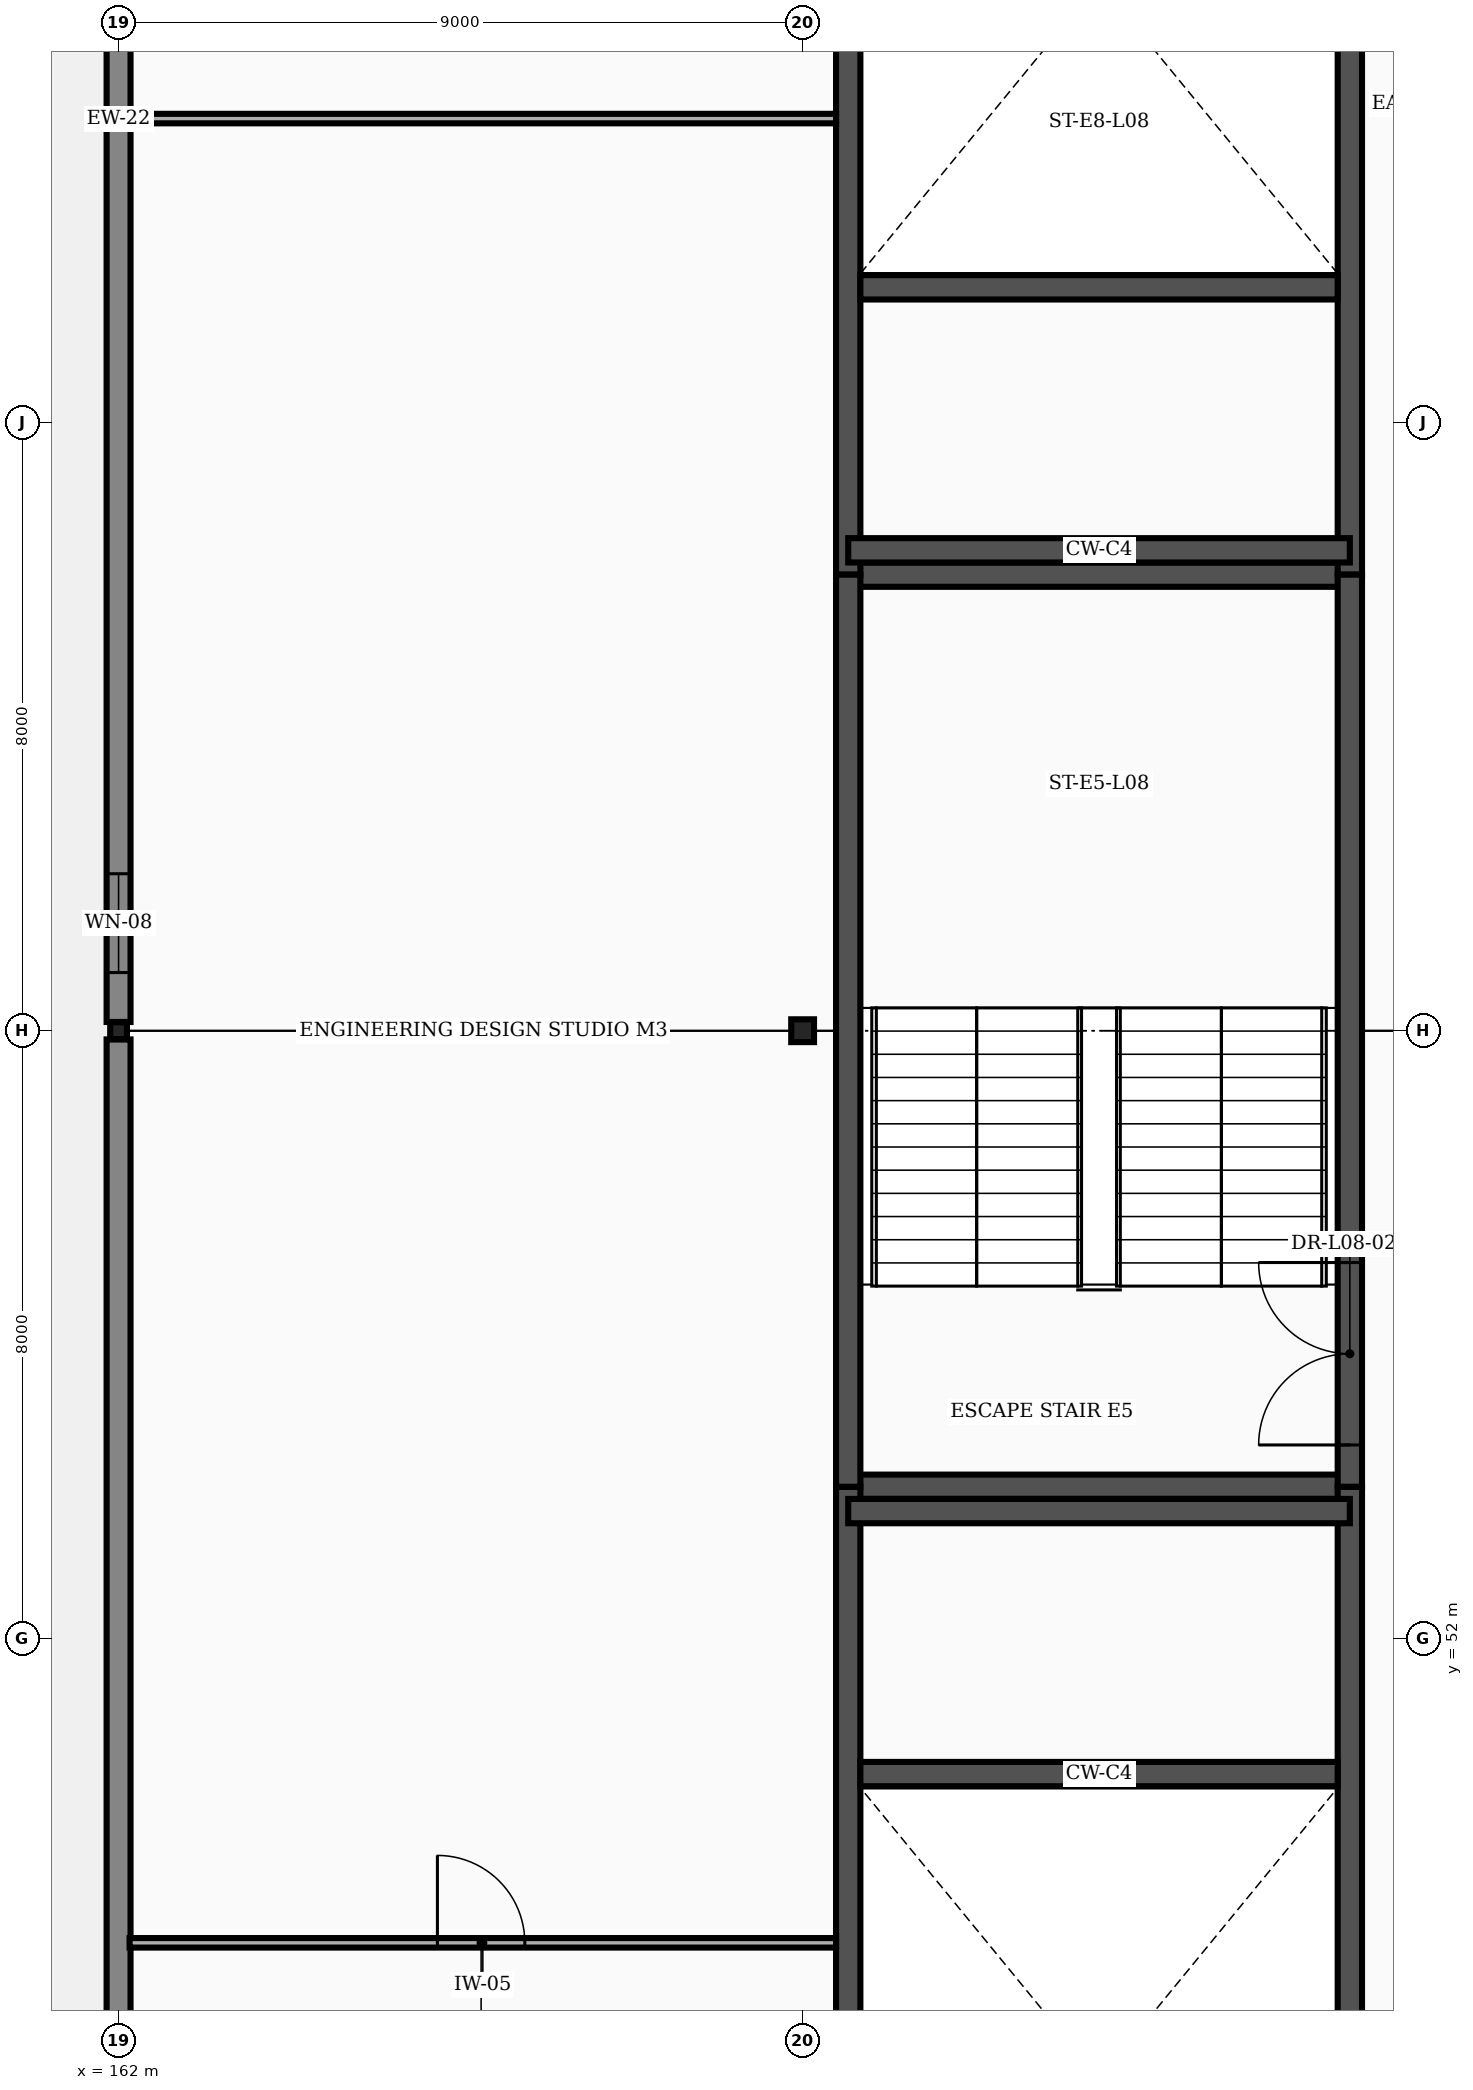
"""IFC4 building model, lengths in metres.
Left out: names, types, materials, properties, quantities, classifications, styles, units other than length and angle.
Written with IfcOpenShell. Run it as: python <this file> out.ifc"""

import sys

from ifc_helpers import new_model, si_unit, direction, frame, frame_2d, origin, origin_2d, place, context, subcontext, project, spatial, rectangle, hollow_rectangle, extrude, element, fill, save


model = new_model("IFC4")
c1 = context("Model", 3, precision=1e-05, world=origin(), true_north=direction((0.0, 1.0)))
c2 = subcontext(c1, "Body", "Model", "MODEL_VIEW")
j1 = project(units=[si_unit("LENGTHUNIT", "METRE"), si_unit("PLANEANGLEUNIT", "RADIAN")], contexts=[c1])
p1 = place(None, origin())
s1 = spatial("IfcSite", under=j1, at=p1, CompositionType="ELEMENT")
p2 = place(p1, origin())
s2 = spatial("IfcBuilding", under=s1, at=p2, CompositionType="ELEMENT")
p3 = place(p2, frame((0.0, 0.0, 37.8)))
s3 = spatial("IfcBuildingStorey", under=s2, at=p3, CompositionType="ELEMENT", Elevation=37.8)
p4 = place(p3, frame((171.0, 60.0, 0.0), z_axis=(0.0, 0.0, 1.0), x_axis=(1.0, 0.0, 0.0)))
e1 = element("IfcColumn", 1, at=p4, inside=s3, PredefinedType="COLUMN", context=c2, shape_type="SweptSolid", body=[
    extrude(hollow_rectangle(XDim=0.3, YDim=0.3, WallThickness=0.012, at=origin_2d()), origin(), (0.0, 0.0, 1.0), 3.9),
])
p5 = place(p3, frame((162.0, 60.0, 0.0), z_axis=(0.0, 0.0, 1.0), x_axis=(1.0, 0.0, 0.0)))
e2 = element("IfcColumn", 2, at=p5, inside=s3, PredefinedType="COLUMN", context=c2, shape_type="SweptSolid", body=[
    extrude(hollow_rectangle(XDim=0.22, YDim=0.22, WallThickness=0.01, at=origin_2d()), origin(), (0.0, 0.0, 1.0), 3.9),
])
p6 = place(p3, frame((162.0, 36.115, 0.0), z_axis=(0.0, 0.0, 1.0), x_axis=(0.0, 1.0, 0.0)))
e3 = element("IfcWall", 3, at=p6, inside=s3, PredefinedType="STANDARD", context=c2, shape_type="SweptSolid", body=[
    extrude(rectangle(XDim=23.77, YDim=0.315, at=frame_2d((11.885, 0.0))), origin(), (0.0, 0.0, 1.0), 2.953),
])
p7 = place(p6, frame((0.65, 0.0, 0.7)))
e4 = element("IfcOpeningElement", 4, at=p7, cuts=e3, PredefinedType="OPENING", context=c2, shape_type="SweptSolid", body=[
    extrude(rectangle(XDim=1.3, YDim=1.9, at=frame_2d((0.65, 0.95))), frame((0.0, 0.169, 0.0), z_axis=(0.0, -1.0, 0.0), x_axis=(1.0, 0.0, 0.0)), (0.0, 0.0, 1.0), 0.339),
])
p8 = place(p3, frame((162.0, 60.115, 0.0), z_axis=(0.0, 0.0, 1.0), x_axis=(0.0, 1.0, 0.0)))
e5 = element("IfcWall", 5, at=p8, inside=s3, PredefinedType="STANDARD", context=c2, shape_type="SweptSolid", body=[
    extrude(rectangle(XDim=23.77, YDim=0.315, at=frame_2d((11.885, 0.0))), origin(), (0.0, 0.0, 1.0), 2.953),
])
p9 = place(p8, frame((0.65, 0.0, 0.7)))
e6 = element("IfcOpeningElement", 6, at=p9, cuts=e5, PredefinedType="OPENING", context=c2, shape_type="SweptSolid", body=[
    extrude(rectangle(XDim=1.3, YDim=1.9, at=frame_2d((0.65, 0.95))), frame((0.0, 0.169, 0.0), z_axis=(0.0, -1.0, 0.0), x_axis=(1.0, 0.0, 0.0)), (0.0, 0.0, 1.0), 0.339),
])
p10 = place(p3, frame((171.6, 54.0, 0.0), z_axis=(0.0, 0.0, 1.0), x_axis=(1.0, 0.0, 0.0)))
e7 = element("IfcWall", 7, at=p10, inside=s3, PredefinedType="SHEAR", context=c2, shape_type="SweptSolid", body=[
    extrude(rectangle(XDim=6.6, YDim=0.32, at=frame_2d((3.3, 0.0))), origin(), (0.0, 0.0, 1.0), 3.565),
])
p11 = place(p3, frame((171.6, 39.4, 0.0), z_axis=(0.0, 0.0, 1.0), x_axis=(0.0, 1.0, 0.0)))
e8 = element("IfcWall", 8, at=p11, inside=s3, PredefinedType="SHEAR", context=c2, shape_type="SweptSolid", body=[
    extrude(rectangle(XDim=14.6, YDim=0.32, at=frame_2d((7.3, 0.0))), origin(), (0.0, 0.0, 1.0), 3.565),
])
p12 = place(p3, frame((178.2, 39.4, 0.0), z_axis=(0.0, 0.0, 1.0), x_axis=(0.0, 1.0, 0.0)))
e9 = element("IfcWall", 9, at=p12, inside=s3, PredefinedType="SHEAR", context=c2, shape_type="SweptSolid", body=[
    extrude(rectangle(XDim=14.6, YDim=0.32, at=frame_2d((7.3, 0.0))), origin(), (0.0, 0.0, 1.0), 3.565),
])
p13 = place(p12, frame((0.55, 0.0, 0.0)))
e10 = element("IfcOpeningElement", 10, at=p13, cuts=e9, PredefinedType="OPENING", context=c2, shape_type="SweptSolid", body=[
    extrude(rectangle(XDim=2.4, YDim=2.25, at=frame_2d((1.2, 1.125))), frame((0.0, 0.172, 0.0), z_axis=(0.0, -1.0, 0.0), x_axis=(1.0, 0.0, 0.0)), (0.0, 0.0, 1.0), 0.344),
])
p14 = place(p3, frame((171.76, 50.22, 0.0), z_axis=(0.0, 0.0, 1.0), x_axis=(1.0, 0.0, 0.0)))
e11 = element("IfcWall", 11, at=p14, inside=s3, PredefinedType="SHEAR", context=c2, shape_type="SweptSolid", body=[
    extrude(rectangle(XDim=6.28, YDim=0.32, at=frame_2d((3.14, 0.0))), origin(), (0.0, 0.0, 1.0), 3.565),
])
p15 = place(p3, frame((171.6, 66.0, 0.0), z_axis=(0.0, 0.0, 1.0), x_axis=(1.0, 0.0, 0.0)))
e12 = element("IfcWall", 12, at=p15, inside=s3, PredefinedType="SHEAR", context=c2, shape_type="SweptSolid", body=[
    extrude(rectangle(XDim=6.6, YDim=0.32, at=frame_2d((3.3, 0.0))), origin(), (0.0, 0.0, 1.0), 3.565),
])
p16 = place(p3, frame((171.6, 66.0, 0.0), z_axis=(0.0, 0.0, 1.0), x_axis=(0.0, 1.0, 0.0)))
e13 = element("IfcWall", 13, at=p16, inside=s3, PredefinedType="SHEAR", context=c2, shape_type="SweptSolid", body=[
    extrude(rectangle(XDim=14.6, YDim=0.32, at=frame_2d((7.3, 0.0))), origin(), (0.0, 0.0, 1.0), 3.565),
])
p17 = place(p3, frame((178.2, 66.0, 0.0), z_axis=(0.0, 0.0, 1.0), x_axis=(0.0, 1.0, 0.0)))
e14 = element("IfcWall", 14, at=p17, inside=s3, PredefinedType="SHEAR", context=c2, shape_type="SweptSolid", body=[
    extrude(rectangle(XDim=14.6, YDim=0.32, at=frame_2d((7.3, 0.0))), origin(), (0.0, 0.0, 1.0), 3.565),
])
p18 = place(p17, frame((11.65, 0.0, 0.0)))
e15 = element("IfcOpeningElement", 15, at=p18, cuts=e14, PredefinedType="OPENING", context=c2, shape_type="SweptSolid", body=[
    extrude(rectangle(XDim=2.4, YDim=2.25, at=frame_2d((1.2, 1.125))), frame((0.0, 0.172, 0.0), z_axis=(0.0, -1.0, 0.0), x_axis=(1.0, 0.0, 0.0)), (0.0, 0.0, 1.0), 0.344),
])
p19 = place(p3, frame((171.76, 69.78, 0.0), z_axis=(0.0, 0.0, 1.0), x_axis=(1.0, 0.0, 0.0)))
e16 = element("IfcWall", 16, at=p19, inside=s3, PredefinedType="SHEAR", context=c2, shape_type="SweptSolid", body=[
    extrude(rectangle(XDim=6.28, YDim=0.32, at=frame_2d((3.14, 0.0))), origin(), (0.0, 0.0, 1.0), 3.565),
])
for number, where, z_axis, x_axis in (
    (17, (171.6, 53.68, 0.0), (0.0, 0.0, 1.0), (1.0, 0.0, 0.0)),
    (18, (171.6, 66.32, 0.0), (0.0, 0.0, 1.0), (1.0, 0.0, 0.0)),
):
    element("IfcWall", number, at=place(p3, frame(where, z_axis=z_axis, x_axis=x_axis)), inside=s3, PredefinedType="SHEAR", context=c2, shape_type="SweptSolid", body=[
        extrude(rectangle(XDim=6.6, YDim=0.32, at=frame_2d((3.3, 0.0))), origin(), (0.0, 0.0, 1.0), 3.565),
    ])
p20 = place(p3, frame((171.6, 54.0, 0.0), z_axis=(0.0, 0.0, 1.0), x_axis=(0.0, 1.0, 0.0)))
e19 = element("IfcWall", 19, at=p20, inside=s3, PredefinedType="SHEAR", context=c2, shape_type="SweptSolid", body=[
    extrude(rectangle(XDim=12.0, YDim=0.32, at=frame_2d((6.0, 0.0))), origin(), (0.0, 0.0, 1.0), 3.565),
])
p21 = place(p3, frame((178.2, 54.0, 0.0), z_axis=(0.0, 0.0, 1.0), x_axis=(0.0, 1.0, 0.0)))
e20 = element("IfcWall", 20, at=p21, inside=s3, PredefinedType="SHEAR", context=c2, shape_type="SweptSolid", body=[
    extrude(rectangle(XDim=12.0, YDim=0.32, at=frame_2d((6.0, 0.0))), origin(), (0.0, 0.0, 1.0), 3.565),
])
p22 = place(p21, frame((0.55, 0.0, 0.0)))
e21 = element("IfcOpeningElement", 21, at=p22, cuts=e20, PredefinedType="OPENING", context=c2, shape_type="SweptSolid", body=[
    extrude(rectangle(XDim=2.4, YDim=2.25, at=frame_2d((1.2, 1.125))), frame((0.0, 0.172, 0.0), z_axis=(0.0, -1.0, 0.0), x_axis=(1.0, 0.0, 0.0)), (0.0, 0.0, 1.0), 0.344),
])
p23 = place(p3, frame((162.145, 48.0, 0.0), z_axis=(0.0, 0.0, 1.0), x_axis=(1.0, 0.0, 0.0)))
e22 = element("IfcWall", 22, at=p23, inside=s3, PredefinedType="PARTITIONING", context=c2, shape_type="SweptSolid", body=[
    extrude(rectangle(XDim=9.295, YDim=0.125, at=frame_2d((4.647, 0.0))), origin(), (0.0, 0.0, 1.0), 3.565),
])
p24 = place(p23, frame((4.05, 0.0, 0.0)))
e23 = element("IfcOpeningElement", 23, at=p24, cuts=e22, PredefinedType="OPENING", context=c2, shape_type="SweptSolid", body=[
    extrude(rectangle(XDim=1.15, YDim=2.15, at=frame_2d((0.575, 1.075))), frame((0.0, 0.074, 0.0), z_axis=(0.0, -1.0, 0.0), x_axis=(1.0, 0.0, 0.0)), (0.0, 0.0, 1.0), 0.149),
])
p25 = place(p3, frame((162.145, 72.0, 0.0), z_axis=(0.0, 0.0, 1.0), x_axis=(1.0, 0.0, 0.0)))
e24 = element("IfcWall", 24, at=p25, inside=s3, PredefinedType="PARTITIONING", context=c2, shape_type="SweptSolid", body=[
    extrude(rectangle(XDim=9.295, YDim=0.125, at=frame_2d((4.647, 0.0))), origin(), (0.0, 0.0, 1.0), 3.565),
])
p26 = place(p9, origin())
e25 = element("IfcWindow", 25, at=p26, inside=s3, PartitioningType="SINGLE_PANEL", PredefinedType="WINDOW", context=c2, shape_type="SweptSolid", body=[
    extrude(rectangle(XDim=1.3, YDim=1.9, at=frame_2d((0.65, 0.95))), frame((0.0, 0.03, 0.0), z_axis=(0.0, -1.0, 0.0), x_axis=(1.0, 0.0, 0.0)), (0.0, 0.0, 1.0), 0.06),
])
fill(e6, e25)
p27 = place(p22, origin())
e26 = element("IfcDoor", 26, at=p27, inside=s3, OperationType="DOUBLE_DOOR_SINGLE_SWING", PredefinedType="DOOR", context=c2, shape_type="SweptSolid", body=[
    extrude(rectangle(XDim=2.4, YDim=2.25, at=frame_2d((1.2, 1.125))), frame((0.0, 0.025, 0.0), z_axis=(0.0, -1.0, 0.0), x_axis=(1.0, 0.0, 0.0)), (0.0, 0.0, 1.0), 0.05),
])
fill(e21, e26)
p28 = place(p24, origin())
e27 = element("IfcDoor", 27, at=p28, inside=s3, OperationType="SINGLE_SWING_LEFT", PredefinedType="DOOR", context=c2, shape_type="SweptSolid", body=[
    extrude(rectangle(XDim=1.15, YDim=2.15, at=frame_2d((0.575, 1.075))), frame((0.0, 0.025, 0.0), z_axis=(0.0, -1.0, 0.0), x_axis=(1.0, 0.0, 0.0)), (0.0, 0.0, 1.0), 0.05),
])
fill(e23, e27)
save(model, sys.argv[1])
